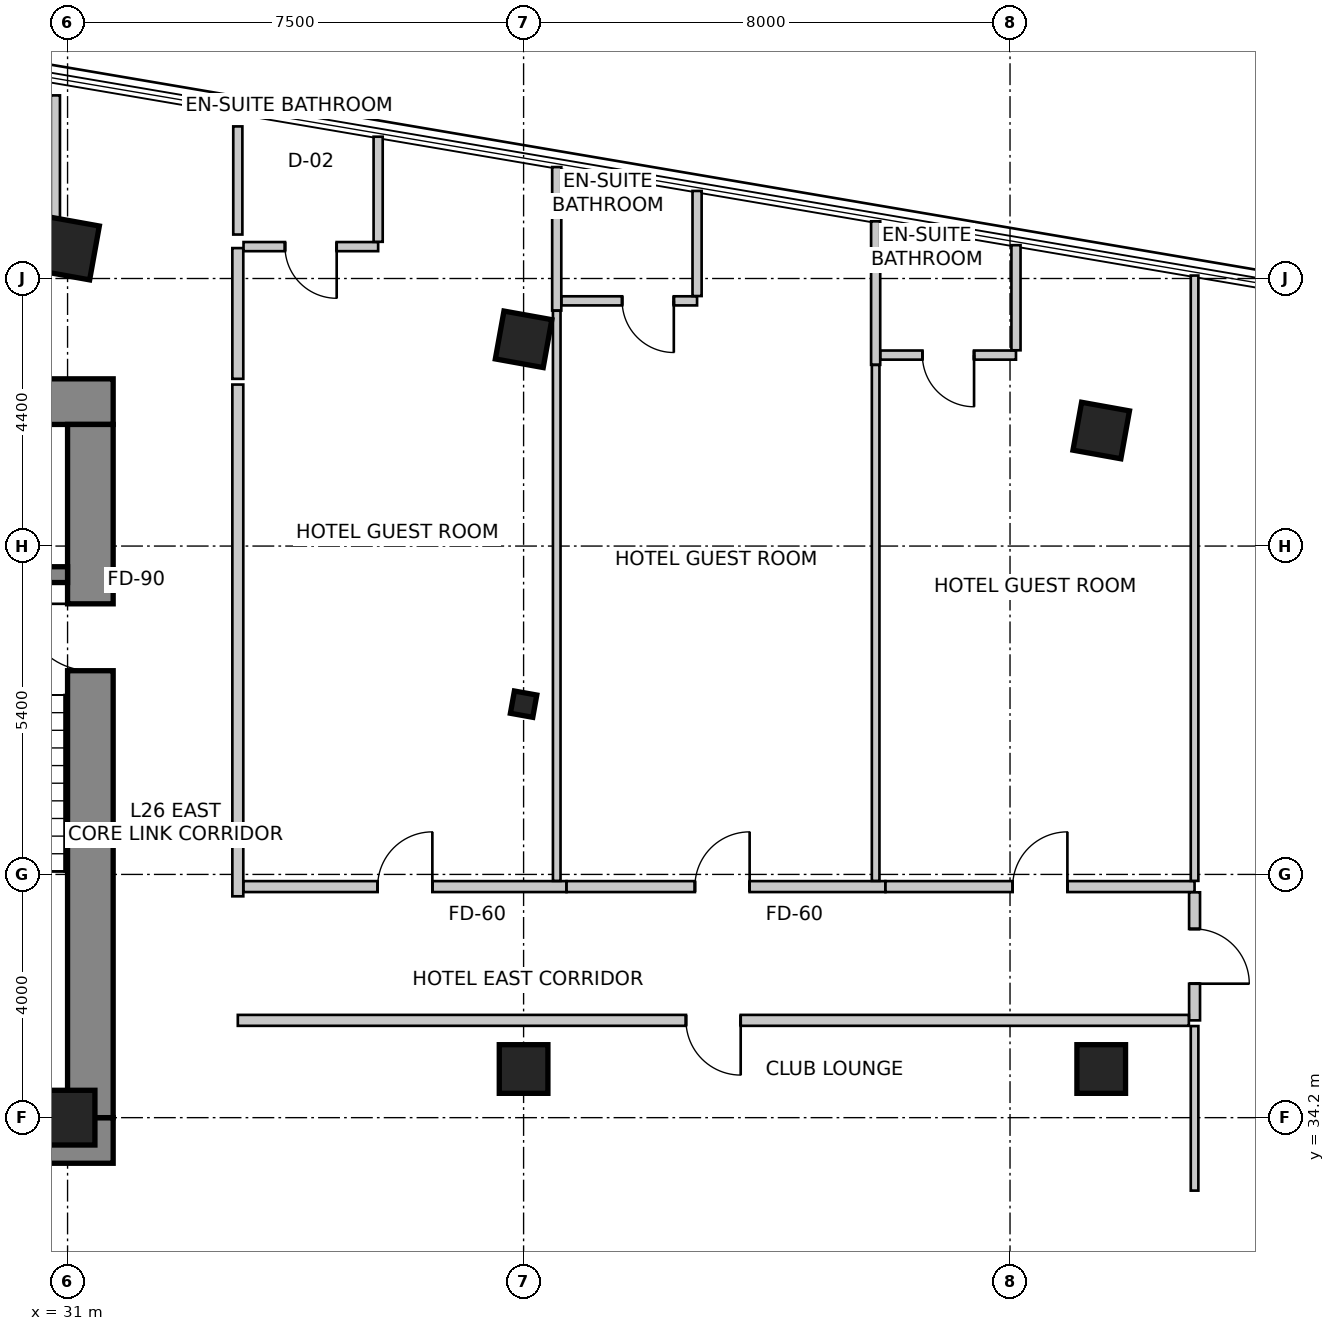
"""IFC4 building model, lengths in metres.
Left out: names, types, materials, properties, quantities, classifications, styles, units other than length and angle.
Written with IfcOpenShell. Run it as: python <this file> out.ifc"""

import sys

from ifc_helpers import new_model, si_unit, direction, frame, frame_2d, origin, origin_2d, place, context, subcontext, project, spatial, rectangle, i_section, extrude, source, transform, mapped, element, fill, save


model = new_model("IFC4")
c1 = context("Model", 3, precision=1e-05, world=origin(), true_north=direction((0.0, 1.0)))
c2 = subcontext(c1, "Body", "Model", "MODEL_VIEW")
j1 = project(units=[si_unit("LENGTHUNIT", "METRE"), si_unit("PLANEANGLEUNIT", "RADIAN")], contexts=[c1])
p1 = place(None, origin())
s1 = spatial("IfcSite", under=j1, at=p1, CompositionType="ELEMENT")
p2 = place(p1, origin())
s2 = spatial("IfcBuilding", under=s1, at=p2, CompositionType="ELEMENT")
p3 = place(p2, frame((0.0, 0.0, 110.6)))
s3 = spatial("IfcBuildingStorey", under=s2, at=p3, CompositionType="ELEMENT", Elevation=110.6)
p4 = place(p3, frame((15.85, 45.975, 0.0), z_axis=(0.0, 0.0, 1.0), x_axis=(1.0, 0.0, 0.0)))
e1 = element("IfcWall", 1, at=p4, inside=s3, PredefinedType="SHEAR", context=c2, shape_type="SweptSolid", body=[
    extrude(rectangle(XDim=15.9, YDim=0.75, at=frame_2d((7.95, 0.0))), origin(), (0.0, 0.0, 1.0), 3.6),
])
p5 = place(p3, frame((15.85, 33.825, 0.0), z_axis=(0.0, 0.0, 1.0), x_axis=(1.0, 0.0, 0.0)))
e2 = element("IfcWall", 2, at=p5, inside=s3, PredefinedType="SHEAR", context=c2, shape_type="SweptSolid", body=[
    extrude(rectangle(XDim=15.9, YDim=0.75, at=frame_2d((7.95, 0.0))), origin(), (0.0, 0.0, 1.0), 3.6),
])
m1 = source(origin(), c2, "Body", "SweptSolid", [
    extrude(rectangle(XDim=1.3, YDim=2.15, at=frame_2d((0.65, 1.075))), frame((0.0, 0.385, 0.0), z_axis=(0.0, -1.0, 0.0), x_axis=(1.0, 0.0, 0.0)), (0.0, 0.0, 1.0), 0.77),
])
p6 = place(p5, frame((10.08, 0.0, 0.0)))
e3 = element("IfcOpeningElement", 3, at=p6, cuts=e2, PredefinedType="OPENING", context=c2, shape_type="MappedRepresentation", body=[
    mapped(m1, transform((0.0, 0.0, 0.0), scale=1.0)),
])
p7 = place(p3, frame((31.375, 34.2, 0.0), z_axis=(0.0, 0.0, 1.0), x_axis=(0.0, 1.0, 0.0)))
e4 = element("IfcWall", 4, at=p7, inside=s3, PredefinedType="SHEAR", context=c2, shape_type="SweptSolid", body=[
    extrude(rectangle(XDim=11.4, YDim=0.75, at=frame_2d((5.7, 0.0))), origin(), (0.0, 0.0, 1.0), 3.6),
])
m2 = source(origin(), c2, "Body", "SweptSolid", [
    extrude(rectangle(XDim=1.1, YDim=2.15, at=frame_2d((0.55, 1.075))), frame((0.0, 0.385, 0.0), z_axis=(0.0, -1.0, 0.0), x_axis=(1.0, 0.0, 0.0)), (0.0, 0.0, 1.0), 0.77),
])
p8 = place(p7, frame((7.35, 0.0, 0.0)))
e5 = element("IfcOpeningElement", 5, at=p8, cuts=e4, PredefinedType="OPENING", context=c2, shape_type="MappedRepresentation", body=[
    mapped(m2, transform((0.0, 0.0, 0.0), scale=1.0)),
])
p9 = place(p3, frame((27.5, 43.13, 0.0), z_axis=(0.0, 0.0, 1.0), x_axis=(1.0, 0.0, 0.0)))
e6 = element("IfcWall", 6, at=p9, inside=s3, PredefinedType="SHEAR", context=c2, shape_type="SweptSolid", body=[
    extrude(rectangle(XDim=3.5, YDim=0.26, at=frame_2d((1.75, 0.0))), origin(), (0.0, 0.0, 1.0), 3.6),
])
m3 = source(origin(), c2, "Body", "SweptSolid", [
    extrude(rectangle(XDim=0.9, YDim=0.9, at=origin_2d()), origin(), (0.0, 0.0, 1.0), 3.6),
])
p10 = place(p3, frame((31.0, 48.5, 0.0), z_axis=(0.0, 0.0, 1.0), x_axis=(0.984195607969, -0.17708474032, 0.0)))
e7 = element("IfcColumn", 7, at=p10, inside=s3, PredefinedType="COLUMN", context=c2, shape_type="MappedRepresentation", body=[
    mapped(m3, transform((0.0, 0.0, 0.0), scale=1.0)),
])
m4 = source(origin(), c2, "Body", "SweptSolid", [
    extrude(rectangle(XDim=0.8, YDim=0.8, at=origin_2d()), origin(), (0.0, 0.0, 1.0), 3.6),
])
for number, where, z_axis, x_axis in (
    (8, (38.5, 47.0, 0.0), (0.0, 0.0, 1.0), (0.984, -0.177, 0.0)),
    (9, (48.0, 45.5, 0.0), (0.0, 0.0, 1.0), (0.984, -0.177, 0.0)),
):
    element("IfcColumn", number, at=place(p3, frame(where, z_axis=z_axis, x_axis=x_axis)), inside=s3, PredefinedType="COLUMN", context=c2, shape_type="MappedRepresentation", body=[
        mapped(m4, transform((0.0, 0.0, 0.0), scale=1.0)),
    ])
p11 = place(p3, frame((31.0, 34.2, 0.0), z_axis=(0.0, 0.0, 1.0), x_axis=(1.0, 0.0, 0.0)))
e10 = element("IfcColumn", 10, at=p11, inside=s3, PredefinedType="COLUMN", context=c2, shape_type="MappedRepresentation", body=[
    mapped(m3, transform((0.0, 0.0, 0.0), scale=1.0)),
])
for number, where, z_axis, x_axis in (
    (11, (38.5, 35.0, 0.0), (0.0, 0.0, 1.0), (1.0, 0.0, 0.0)),
    (12, (48.0, 35.0, 0.0), (0.0, 0.0, 1.0), (1.0, 0.0, 0.0)),
):
    element("IfcColumn", number, at=place(p3, frame(where, z_axis=z_axis, x_axis=x_axis)), inside=s3, PredefinedType="COLUMN", context=c2, shape_type="MappedRepresentation", body=[
        mapped(m4, transform((0.0, 0.0, 0.0), scale=1.0)),
    ])
m5 = source(origin(), c2, "Body", "SweptSolid", [
    extrude(i_section(OverallWidth=0.374, OverallDepth=0.372, WebThickness=0.016, FlangeThickness=0.026, FilletRadius=0.015, at=origin_2d()), origin(), (0.0, 0.0, 1.0), 3.6),
])
p12 = place(p3, frame((38.5, 41.0, 0.0), z_axis=(0.0, 0.0, 1.0), x_axis=(0.984195607969, -0.17708474032, 0.0)))
e13 = element("IfcColumn", 13, at=p12, inside=s3, PredefinedType="COLUMN", context=c2, shape_type="MappedRepresentation", body=[
    mapped(m5, transform((0.0, 0.0, 0.0), scale=1.0)),
])
p13 = place(p3, frame((23.962, 48.5, 0.0), z_axis=(0.0, 0.0, 1.0), x_axis=(1.0, 0.0, 0.0)))
e14 = element("IfcWall", 14, at=p13, inside=s3, PredefinedType="PARTITIONING", context=c2, shape_type="SweptSolid", body=[
    extrude(rectangle(XDim=6.998, YDim=0.18, at=frame_2d((3.499, 0.0))), origin(), (0.0, 0.0, 1.0), 2.492),
])
m6 = source(origin(), c2, "Body", "SweptSolid", [
    extrude(rectangle(XDim=0.85, YDim=2.15, at=frame_2d((0.425, 1.075))), frame((0.0, 0.1, 0.0), z_axis=(0.0, -1.0, 0.0), x_axis=(1.0, 0.0, 0.0)), (0.0, 0.0, 1.0), 0.2),
])
p14 = place(p13, frame((3.074, 0.0, 0.0)))
e15 = element("IfcOpeningElement", 15, at=p14, cuts=e14, PredefinedType="OPENING", context=c2, shape_type="MappedRepresentation", body=[
    mapped(m6, transform((0.0, 0.0, 0.0), scale=1.0)),
])
p15 = place(p3, frame((33.8, 48.5, 0.0), z_axis=(0.0, 0.0, 1.0), x_axis=(0.0, -1.0, 0.0)))
e16 = element("IfcWall", 16, at=p15, inside=s3, PredefinedType="PARTITIONING", context=c2, shape_type="SweptSolid", body=[
    extrude(rectangle(XDim=2.15, YDim=0.18, at=frame_2d((1.075, 0.0))), origin(), (0.0, 0.0, 1.0), 2.492),
])
p16 = place(p3, frame((33.8, 46.256, 0.0), z_axis=(0.0, 0.0, 1.0), x_axis=(0.0, -1.0, 0.0)))
e17 = element("IfcWall", 17, at=p16, inside=s3, PredefinedType="PARTITIONING", context=c2, shape_type="SweptSolid", body=[
    extrude(rectangle(XDim=8.416, YDim=0.18, at=frame_2d((4.208, 0.0))), origin(), (0.0, 0.0, 1.0), 2.922),
])
p17 = place(p3, frame((33.894, 38.0, 0.0), z_axis=(0.0, 0.0, 1.0), x_axis=(1.0, 0.0, 0.0)))
e18 = element("IfcWall", 18, at=p17, inside=s3, PredefinedType="PARTITIONING", context=c2, shape_type="SweptSolid", body=[
    extrude(rectangle(XDim=5.311, YDim=0.18, at=frame_2d((2.656, 0.0))), origin(), (0.0, 0.0, 1.0), 2.803),
])
m7 = source(origin(), c2, "Body", "SweptSolid", [
    extrude(rectangle(XDim=0.9, YDim=2.15, at=frame_2d((0.45, 1.075))), frame((0.0, 0.1, 0.0), z_axis=(0.0, -1.0, 0.0), x_axis=(1.0, 0.0, 0.0)), (0.0, 0.0, 1.0), 0.2),
])
p18 = place(p17, frame((2.206, 0.0, 0.0)))
e19 = element("IfcOpeningElement", 19, at=p18, cuts=e18, PredefinedType="OPENING", context=c2, shape_type="MappedRepresentation", body=[
    mapped(m7, transform((0.0, 0.0, 0.0), scale=1.0)),
])
p19 = place(p3, frame((39.207, 38.0, 0.0), z_axis=(0.0, 0.0, 1.0), x_axis=(1.0, 0.0, 0.0)))
e20 = element("IfcWall", 20, at=p19, inside=s3, PredefinedType="PARTITIONING", context=c2, shape_type="SweptSolid", body=[
    extrude(rectangle(XDim=5.243, YDim=0.18, at=frame_2d((2.622, 0.0))), origin(), (0.0, 0.0, 1.0), 2.922),
])
p20 = place(p19, frame((2.111, 0.0, 0.0)))
e21 = element("IfcOpeningElement", 21, at=p20, cuts=e20, PredefinedType="OPENING", context=c2, shape_type="MappedRepresentation", body=[
    mapped(m7, transform((0.0, 0.0, 0.0), scale=1.0)),
])
p21 = place(p3, frame((44.452, 38.0, 0.0), z_axis=(0.0, 0.0, 1.0), x_axis=(1.0, 0.0, 0.0)))
e22 = element("IfcWall", 22, at=p21, inside=s3, PredefinedType="PARTITIONING", context=c2, shape_type="SweptSolid", body=[
    extrude(rectangle(XDim=5.083, YDim=0.18, at=frame_2d((2.542, 0.0))), origin(), (0.0, 0.0, 1.0), 2.803),
])
p22 = place(p21, frame((2.092, 0.0, 0.0)))
e23 = element("IfcOpeningElement", 23, at=p22, cuts=e22, PredefinedType="OPENING", context=c2, shape_type="MappedRepresentation", body=[
    mapped(m7, transform((0.0, 0.0, 0.0), scale=1.0)),
])
p23 = place(p3, frame((49.535, 37.906, 0.0), z_axis=(0.0, 0.0, 1.0), x_axis=(0.0, -1.0, 0.0)))
e24 = element("IfcWall", 24, at=p23, inside=s3, PredefinedType="PARTITIONING", context=c2, shape_type="SweptSolid", body=[
    extrude(rectangle(XDim=2.106, YDim=0.18, at=frame_2d((1.053, 0.0))), origin(), (0.0, 0.0, 1.0), 3.35),
])
p24 = place(p23, frame((0.603, 0.0, 0.0)))
e25 = element("IfcOpeningElement", 25, at=p24, cuts=e24, PredefinedType="OPENING", context=c2, shape_type="MappedRepresentation", body=[
    mapped(m7, transform((0.0, 0.0, 0.0), scale=1.0)),
])
p25 = place(p3, frame((49.441, 35.8, 0.0), z_axis=(0.0, 0.0, 1.0), x_axis=(-1.0, 0.0, 0.0)))
e26 = element("IfcWall", 26, at=p25, inside=s3, PredefinedType="PARTITIONING", context=c2, shape_type="SweptSolid", body=[
    extrude(rectangle(XDim=15.641, YDim=0.18, at=frame_2d((7.82, 0.0))), origin(), (0.0, 0.0, 1.0), 2.803),
])
p26 = place(p25, frame((7.371, 0.0, 0.0)))
e27 = element("IfcOpeningElement", 27, at=p26, cuts=e26, PredefinedType="OPENING", context=c2, shape_type="MappedRepresentation", body=[
    mapped(m7, transform((0.0, 0.0, 0.0), scale=1.0)),
])
p27 = place(p3, frame((36.108, 48.524, 0.0), z_axis=(0.0, 0.0, 1.0), x_axis=(-1.0, 0.0, 0.0)))
e28 = element("IfcWall", 28, at=p27, inside=s3, PredefinedType="PARTITIONING", context=c2, shape_type="SweptSolid", body=[
    extrude(rectangle(XDim=2.214, YDim=0.15, at=frame_2d((1.107, 0.0))), origin(), (0.0, 0.0, 1.0), 3.35),
])
m8 = source(origin(), c2, "Body", "SweptSolid", [
    extrude(rectangle(XDim=0.85, YDim=2.15, at=frame_2d((0.425, 1.075))), frame((0.0, 0.085, 0.0), z_axis=(0.0, -1.0, 0.0), x_axis=(1.0, 0.0, 0.0)), (0.0, 0.0, 1.0), 0.17),
])
p28 = place(p27, frame((0.682, 0.0, 0.0)))
e29 = element("IfcOpeningElement", 29, at=p28, cuts=e28, PredefinedType="OPENING", context=c2, shape_type="MappedRepresentation", body=[
    mapped(m8, transform((0.0, 0.0, 0.0), scale=1.0)),
])
p29 = place(p3, frame((36.108, 50.332, 0.0), z_axis=(0.0, 0.0, 1.0), x_axis=(0.0, -1.0, 0.0)))
e30 = element("IfcWall", 30, at=p29, inside=s3, PredefinedType="PARTITIONING", context=c2, shape_type="SweptSolid", body=[
    extrude(rectangle(XDim=1.728, YDim=0.15, at=frame_2d((0.864, 0.0))), origin(), (0.0, 0.0, 1.0), 3.35),
])
p30 = place(p3, frame((39.045, 49.833, 0.0), z_axis=(0.0, 0.0, 1.0), x_axis=(0.0, -1.0, 0.0)))
e31 = element("IfcWall", 31, at=p30, inside=s3, PredefinedType="PARTITIONING", context=c2, shape_type="SweptSolid", body=[
    extrude(rectangle(XDim=2.36, YDim=0.15, at=frame_2d((1.18, 0.0))), origin(), (0.0, 0.0, 1.0), 3.35),
])
p31 = place(p3, frame((39.045, 47.47, 0.0), z_axis=(0.0, 0.0, 1.0), x_axis=(0.0, -1.0, 0.0)))
e32 = element("IfcWall", 32, at=p31, inside=s3, PredefinedType="PARTITIONING", context=c2, shape_type="SweptSolid", body=[
    extrude(rectangle(XDim=9.376, YDim=0.125, at=frame_2d((4.688, 0.0))), origin(), (0.0, 0.0, 1.0), 2.492),
])
p32 = place(p3, frame((41.353, 47.633, 0.0), z_axis=(0.0, 0.0, 1.0), x_axis=(-1.0, 0.0, 0.0)))
e33 = element("IfcWall", 33, at=p32, inside=s3, PredefinedType="PARTITIONING", context=c2, shape_type="SweptSolid", body=[
    extrude(rectangle(XDim=2.229, YDim=0.15, at=frame_2d((1.115, 0.0))), origin(), (0.0, 0.0, 1.0), 3.35),
])
p33 = place(p32, frame((0.382, 0.0, 0.0)))
e34 = element("IfcOpeningElement", 34, at=p33, cuts=e33, PredefinedType="OPENING", context=c2, shape_type="MappedRepresentation", body=[
    mapped(m8, transform((0.0, 0.0, 0.0), scale=1.0)),
])
p34 = place(p3, frame((41.353, 49.44, 0.0), z_axis=(0.0, 0.0, 1.0), x_axis=(0.0, -1.0, 0.0)))
e35 = element("IfcWall", 35, at=p34, inside=s3, PredefinedType="PARTITIONING", context=c2, shape_type="SweptSolid", body=[
    extrude(rectangle(XDim=1.729, YDim=0.15, at=frame_2d((0.864, 0.0))), origin(), (0.0, 0.0, 1.0), 3.35),
])
p35 = place(p3, frame((44.29, 48.94, 0.0), z_axis=(0.0, 0.0, 1.0), x_axis=(0.0, -1.0, 0.0)))
e36 = element("IfcWall", 36, at=p35, inside=s3, PredefinedType="PARTITIONING", context=c2, shape_type="SweptSolid", body=[
    extrude(rectangle(XDim=2.36, YDim=0.15, at=frame_2d((1.18, 0.0))), origin(), (0.0, 0.0, 1.0), 3.35),
])
p36 = place(p3, frame((44.29, 46.579, 0.0), z_axis=(0.0, 0.0, 1.0), x_axis=(0.0, -1.0, 0.0)))
e37 = element("IfcWall", 37, at=p36, inside=s3, PredefinedType="PARTITIONING", context=c2, shape_type="SweptSolid", body=[
    extrude(rectangle(XDim=8.485, YDim=0.125, at=frame_2d((4.242, 0.0))), origin(), (0.0, 0.0, 1.0), 2.492),
])
p37 = place(p3, frame((46.598, 46.74, 0.0), z_axis=(0.0, 0.0, 1.0), x_axis=(-1.0, 0.0, 0.0)))
e38 = element("IfcWall", 38, at=p37, inside=s3, PredefinedType="PARTITIONING", context=c2, shape_type="SweptSolid", body=[
    extrude(rectangle(XDim=2.229, YDim=0.15, at=frame_2d((1.115, 0.0))), origin(), (0.0, 0.0, 1.0), 3.35),
])
p38 = place(p37, frame((0.689, 0.0, 0.0)))
e39 = element("IfcOpeningElement", 39, at=p38, cuts=e38, PredefinedType="OPENING", context=c2, shape_type="MappedRepresentation", body=[
    mapped(m8, transform((0.0, 0.0, 0.0), scale=1.0)),
])
p39 = place(p3, frame((46.598, 48.548, 0.0), z_axis=(0.0, 0.0, 1.0), x_axis=(0.0, -1.0, 0.0)))
e40 = element("IfcWall", 40, at=p39, inside=s3, PredefinedType="PARTITIONING", context=c2, shape_type="SweptSolid", body=[
    extrude(rectangle(XDim=1.729, YDim=0.15, at=frame_2d((0.864, 0.0))), origin(), (0.0, 0.0, 1.0), 3.35),
])
p40 = place(p3, frame((49.535, 48.049, 0.0), z_axis=(0.0, 0.0, 1.0), x_axis=(0.0, -1.0, 0.0)))
e41 = element("IfcWall", 41, at=p40, inside=s3, PredefinedType="PARTITIONING", context=c2, shape_type="SweptSolid", body=[
    extrude(rectangle(XDim=9.955, YDim=0.125, at=frame_2d((4.977, 0.0))), origin(), (0.0, 0.0, 1.0), 3.35),
])
p41 = place(p3, frame((49.535, 33.0, 0.0), z_axis=(0.0, 0.0, 1.0), x_axis=(0.0, 1.0, 0.0)))
e42 = element("IfcWall", 42, at=p41, inside=s3, PredefinedType="PARTITIONING", context=c2, shape_type="SweptSolid", body=[
    extrude(rectangle(XDim=2.706, YDim=0.125, at=frame_2d((1.353, 0.0))), origin(), (0.0, 0.0, 1.0), 3.35),
])
p42 = place(p3, frame((30.8, 51.011, 0.0), z_axis=(0.0, 0.0, 1.0), x_axis=(0.0, -1.0, 0.0)))
e43 = element("IfcWall", 43, at=p42, inside=s3, PredefinedType="PARTITIONING", context=c2, shape_type="SweptSolid", body=[
    extrude(rectangle(XDim=2.292, YDim=0.15, at=frame_2d((1.146, 0.0))), origin(), (0.0, 0.0, 1.0), 3.35),
])
p43 = place(p3, frame((33.8, 48.723, 0.0), z_axis=(0.0, 0.0, 1.0), x_axis=(0.0, 1.0, 0.0)))
e44 = element("IfcWall", 44, at=p43, inside=s3, PredefinedType="PARTITIONING", context=c2, shape_type="SweptSolid", body=[
    extrude(rectangle(XDim=1.778, YDim=0.15, at=frame_2d((0.889, 0.0))), origin(), (0.0, 0.0, 1.0), 3.35),
])
m9 = source(origin(), c2, "Body", "SweptSolid", [
    extrude(rectangle(XDim=1.1, YDim=2.15, at=frame_2d((0.55, 1.075))), frame((0.0, 0.025, 0.0), z_axis=(0.0, -1.0, 0.0), x_axis=(1.0, 0.0, 0.0)), (0.0, 0.0, 1.0), 0.05),
])
p44 = place(p8, origin())
e45 = element("IfcDoor", 45, at=p44, inside=s3, OperationType="SINGLE_SWING_RIGHT", PredefinedType="DOOR", context=c2, shape_type="MappedRepresentation", body=[
    mapped(m9, transform((0.0, 0.0, 0.0), scale=1.0)),
])
fill(e5, e45)
m10 = source(origin(), c2, "Body", "SweptSolid", [
    extrude(rectangle(XDim=0.85, YDim=2.15, at=frame_2d((0.425, 1.075))), frame((0.0, 0.025, 0.0), z_axis=(0.0, -1.0, 0.0), x_axis=(1.0, 0.0, 0.0)), (0.0, 0.0, 1.0), 0.05),
])
p45 = place(p28, origin())
e46 = element("IfcDoor", 46, at=p45, inside=s3, OperationType="SINGLE_SWING_LEFT", PredefinedType="DOOR", context=c2, shape_type="MappedRepresentation", body=[
    mapped(m10, transform((0.0, 0.0, 0.0), scale=1.0)),
])
fill(e29, e46)
m11 = source(origin(), c2, "Body", "SweptSolid", [
    extrude(rectangle(XDim=0.9, YDim=2.15, at=frame_2d((0.45, 1.075))), frame((0.0, 0.025, 0.0), z_axis=(0.0, -1.0, 0.0), x_axis=(1.0, 0.0, 0.0)), (0.0, 0.0, 1.0), 0.05),
])
p46 = place(p18, origin())
e47 = element("IfcDoor", 47, at=p46, inside=s3, OperationType="SINGLE_SWING_RIGHT", PredefinedType="DOOR", context=c2, shape_type="MappedRepresentation", body=[
    mapped(m11, transform((0.0, 0.0, 0.0), scale=1.0)),
])
fill(e19, e47)
p47 = place(p33, origin())
e48 = element("IfcDoor", 48, at=p47, inside=s3, OperationType="SINGLE_SWING_LEFT", PredefinedType="DOOR", context=c2, shape_type="MappedRepresentation", body=[
    mapped(m10, transform((0.0, 0.0, 0.0), scale=1.0)),
])
fill(e34, e48)
p48 = place(p20, origin())
e49 = element("IfcDoor", 49, at=p48, inside=s3, OperationType="SINGLE_SWING_RIGHT", PredefinedType="DOOR", context=c2, shape_type="MappedRepresentation", body=[
    mapped(m11, transform((0.0, 0.0, 0.0), scale=1.0)),
])
fill(e21, e49)
p49 = place(p38, origin())
e50 = element("IfcDoor", 50, at=p49, inside=s3, OperationType="SINGLE_SWING_LEFT", PredefinedType="DOOR", context=c2, shape_type="MappedRepresentation", body=[
    mapped(m10, transform((0.0, 0.0, 0.0), scale=1.0)),
])
fill(e39, e50)
p50 = place(p22, origin())
e51 = element("IfcDoor", 51, at=p50, inside=s3, OperationType="SINGLE_SWING_RIGHT", PredefinedType="DOOR", context=c2, shape_type="MappedRepresentation", body=[
    mapped(m11, transform((0.0, 0.0, 0.0), scale=1.0)),
])
fill(e23, e51)
p51 = place(p24, origin())
e52 = element("IfcDoor", 52, at=p51, inside=s3, OperationType="SINGLE_SWING_RIGHT", PredefinedType="DOOR", context=c2, shape_type="MappedRepresentation", body=[
    mapped(m11, transform((0.0, 0.0, 0.0), scale=1.0)),
])
fill(e25, e52)
m12 = source(origin(), c2, "Body", "SweptSolid", [
    extrude(rectangle(XDim=0.9, YDim=2.15, at=frame_2d((0.45, 1.075))), frame((0.0, 0.025, 0.0), z_axis=(0.0, -1.0, 0.0), x_axis=(1.0, 0.0, 0.0)), (0.0, 0.0, 1.0), 0.05),
])
p52 = place(p26, origin())
e53 = element("IfcDoor", 53, at=p52, inside=s3, OperationType="SINGLE_SWING_LEFT", PredefinedType="DOOR", context=c2, shape_type="MappedRepresentation", body=[
    mapped(m12, transform((0.0, 0.0, 0.0), scale=1.0)),
])
fill(e27, e53)
save(model, sys.argv[1])
